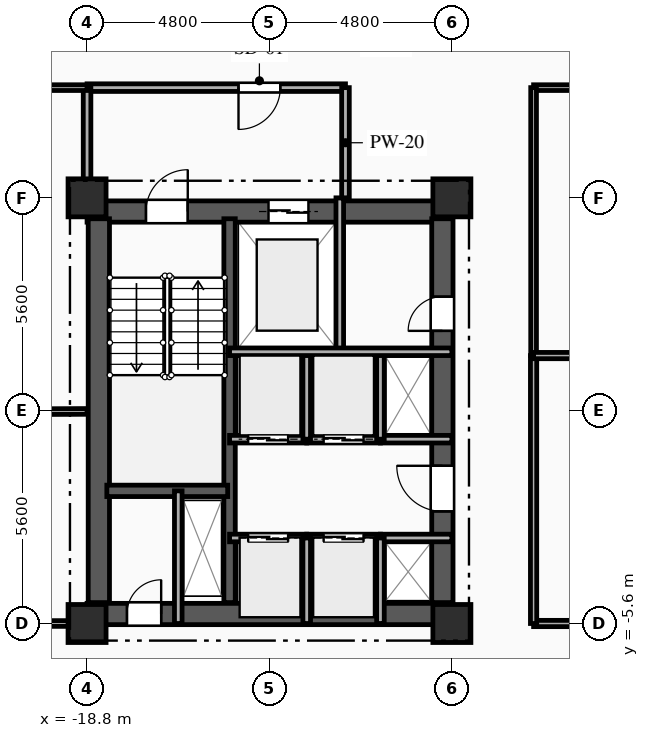
"""IFC4 building model, lengths in metres.
Left out: names, types, materials, properties, quantities, classifications, styles, units other than length and angle.
Written with IfcOpenShell. Run it as: python <this file> out.ifc"""

import sys

from ifc_helpers import new_model, si_unit, direction, frame, frame_2d, origin, origin_2d, place, context, subcontext, project, spatial, rectangle, extrude, element, fill, save


model = new_model("IFC4")
c1 = context("Model", 3, precision=1e-05, world=origin(), true_north=direction((0.0, 1.0)))
c2 = subcontext(c1, "Body", "Model", "MODEL_VIEW")
j1 = project(units=[si_unit("LENGTHUNIT", "METRE"), si_unit("PLANEANGLEUNIT", "RADIAN")], contexts=[c1])
p1 = place(None, origin())
s1 = spatial("IfcSite", under=j1, at=p1, CompositionType="ELEMENT")
p2 = place(p1, origin())
s2 = spatial("IfcBuilding", under=s1, at=p2, CompositionType="ELEMENT")
p3 = place(p2, frame((0.0, 0.0, 119.2)))
s3 = spatial("IfcBuildingStorey", under=s2, at=p3, CompositionType="ELEMENT", Elevation=119.2)
for number, where, z_axis, x_axis in (
    (1, (-18.8, -5.6, 0.0), (0.0, 0.0, 1.0), (1.0, 0.0, 0.0)),
    (2, (-18.8, 5.6, 0.0), (0.0, 0.0, 1.0), (1.0, 0.0, 0.0)),
    (3, (-9.2, -5.6, 0.0), (0.0, 0.0, 1.0), (1.0, 0.0, 0.0)),
    (4, (-9.2, 5.6, 0.0), (0.0, 0.0, 1.0), (1.0, 0.0, 0.0)),
):
    element("IfcColumn", number, at=place(p3, frame(where, z_axis=z_axis, x_axis=x_axis)), inside=s3, PredefinedType="COLUMN", context=c2, shape_type="SweptSolid", body=[
        extrude(rectangle(XDim=1.0, YDim=1.0, at=origin_2d()), origin(), (0.0, 0.0, 1.0), 3.35),
    ])
p4 = place(p3, frame((-18.8, 5.24, 0.0), z_axis=(0.0, 0.0, 1.0), x_axis=(1.0, 0.0, 0.0)))
e5 = element("IfcWall", 5, at=p4, inside=s3, PredefinedType="SHEAR", context=c2, shape_type="SweptSolid", body=[
    extrude(rectangle(XDim=9.6, YDim=0.56, at=frame_2d((4.8, 0.0))), origin(), (0.0, 0.0, 1.0), 3.045),
])
p5 = place(p4, frame((1.55, 0.0, 0.0)))
e6 = element("IfcOpeningElement", 6, at=p5, cuts=e5, PredefinedType="OPENING", context=c2, shape_type="SweptSolid", body=[
    extrude(rectangle(XDim=1.1, YDim=2.15, at=frame_2d((0.55, 1.075))), frame((0.0, 0.29, 0.0), z_axis=(0.0, -1.0, 0.0), x_axis=(1.0, 0.0, 0.0)), (0.0, 0.0, 1.0), 0.58),
])
p6 = place(p4, frame((4.775, 0.0, 0.0)))
e7 = element("IfcOpeningElement", 7, at=p6, cuts=e5, PredefinedType="OPENING", context=c2, shape_type="SweptSolid", body=[
    extrude(rectangle(XDim=1.05, YDim=2.1, at=frame_2d((0.525, 1.05))), frame((0.0, 0.29, 0.0), z_axis=(0.0, -1.0, 0.0), x_axis=(1.0, 0.0, 0.0)), (0.0, 0.0, 1.0), 0.58),
])
p7 = place(p3, frame((-18.8, -5.35, 0.0), z_axis=(0.0, 0.0, 1.0), x_axis=(1.0, 0.0, 0.0)))
e8 = element("IfcWall", 8, at=p7, inside=s3, PredefinedType="SHEAR", context=c2, shape_type="SweptSolid", body=[
    extrude(rectangle(XDim=9.6, YDim=0.56, at=frame_2d((4.8, 0.0))), origin(), (0.0, 0.0, 1.0), 3.045),
])
p8 = place(p7, frame((1.05, 0.0, 0.0)))
e9 = element("IfcOpeningElement", 9, at=p8, cuts=e8, PredefinedType="OPENING", context=c2, shape_type="SweptSolid", body=[
    extrude(rectangle(XDim=0.9, YDim=2.1, at=frame_2d((0.45, 1.05))), frame((0.0, 0.29, 0.0), z_axis=(0.0, -1.0, 0.0), x_axis=(1.0, 0.0, 0.0)), (0.0, 0.0, 1.0), 0.58),
])
p9 = place(p3, frame((-18.49, -5.05, 0.0), z_axis=(0.0, 0.0, 1.0), x_axis=(0.0, 1.0, 0.0)))
e10 = element("IfcWall", 10, at=p9, inside=s3, PredefinedType="SHEAR", context=c2, shape_type="SweptSolid", body=[
    extrude(rectangle(XDim=10.1, YDim=0.56, at=frame_2d((5.05, 0.0))), origin(), (0.0, 0.0, 1.0), 3.045),
])
p10 = place(p3, frame((-9.45, -5.05, 0.0), z_axis=(0.0, 0.0, 1.0), x_axis=(0.0, 1.0, 0.0)))
e11 = element("IfcWall", 11, at=p10, inside=s3, PredefinedType="SHEAR", context=c2, shape_type="SweptSolid", body=[
    extrude(rectangle(XDim=10.1, YDim=0.56, at=frame_2d((5.05, 0.0))), origin(), (0.0, 0.0, 1.0), 3.045),
])
p11 = place(p10, frame((7.15, 0.0, 0.0)))
e12 = element("IfcOpeningElement", 12, at=p11, cuts=e11, PredefinedType="OPENING", context=c2, shape_type="SweptSolid", body=[
    extrude(rectangle(XDim=0.9, YDim=2.1, at=frame_2d((0.45, 1.05))), frame((0.0, 0.29, 0.0), z_axis=(0.0, -1.0, 0.0), x_axis=(1.0, 0.0, 0.0)), (0.0, 0.0, 1.0), 0.58),
])
p12 = place(p10, frame((2.4, 0.0, 0.0)))
e13 = element("IfcOpeningElement", 13, at=p12, cuts=e11, PredefinedType="OPENING", context=c2, shape_type="SweptSolid", body=[
    extrude(rectangle(XDim=1.2, YDim=2.15, at=frame_2d((0.6, 1.075))), frame((0.0, 0.29, 0.0), z_axis=(0.0, -1.0, 0.0), x_axis=(1.0, 0.0, 0.0)), (0.0, 0.0, 1.0), 0.58),
])
p13 = place(p3, frame((-15.05, -5.05, 0.0), z_axis=(0.0, 0.0, 1.0), x_axis=(0.0, 1.0, 0.0)))
e14 = element("IfcWall", 14, at=p13, inside=s3, PredefinedType="SHEAR", context=c2, shape_type="SweptSolid", body=[
    extrude(rectangle(XDim=10.1, YDim=0.3, at=frame_2d((5.05, 0.0))), origin(), (0.0, 0.0, 1.0), 3.045),
])
p14 = place(p3, frame((-18.28, -2.11, 0.0), z_axis=(0.0, 0.0, 1.0), x_axis=(1.0, 0.0, 0.0)))
e15 = element("IfcWall", 15, at=p14, inside=s3, PredefinedType="SHEAR", context=c2, shape_type="SweptSolid", body=[
    extrude(rectangle(XDim=3.18, YDim=0.3, at=frame_2d((1.59, 0.0))), origin(), (0.0, 0.0, 1.0), 3.045),
])
p15 = place(p3, frame((-16.4, -5.6, 0.0), z_axis=(0.0, 0.0, 1.0), x_axis=(0.0, 1.0, 0.0)))
e16 = element("IfcWall", 16, at=p15, inside=s3, PredefinedType="PARTITIONING", context=c2, shape_type="SweptSolid", body=[
    extrude(rectangle(XDim=3.49, YDim=0.2, at=frame_2d((1.745, 0.0))), origin(), (0.0, 0.0, 1.0), 3.045),
])
p16 = place(p3, frame((-12.15, 1.55, 0.0), z_axis=(0.0, 0.0, 1.0), x_axis=(0.0, 1.0, 0.0)))
e17 = element("IfcWall", 17, at=p16, inside=s3, PredefinedType="PARTITIONING", context=c2, shape_type="SweptSolid", body=[
    extrude(rectangle(XDim=4.05, YDim=0.2, at=frame_2d((2.025, 0.0))), origin(), (0.0, 0.0, 1.0), 3.045),
])
p17 = place(p3, frame((-12.0, 8.5, 0.0), z_axis=(0.0, 0.0, 1.0), x_axis=(-1.0, 0.0, 0.0)))
e18 = element("IfcWall", 18, at=p17, inside=s3, PredefinedType="PARTITIONING", context=c2, shape_type="SweptSolid", body=[
    extrude(rectangle(XDim=6.8, YDim=0.2, at=frame_2d((3.4, 0.0))), origin(), (0.0, 0.0, 1.0), 3.045),
])
p18 = place(p17, frame((1.715, 0.0, 0.0)))
e19 = element("IfcOpeningElement", 19, at=p18, cuts=e18, PredefinedType="OPENING", context=c2, shape_type="SweptSolid", body=[
    extrude(rectangle(XDim=1.1, YDim=2.15, at=frame_2d((0.55, 1.075))), frame((0.0, 0.11, 0.0), z_axis=(0.0, -1.0, 0.0), x_axis=(1.0, 0.0, 0.0)), (0.0, 0.0, 1.0), 0.22),
])
p19 = place(p3, frame((-12.0, 5.6, 0.0), z_axis=(0.0, 0.0, 1.0), x_axis=(0.0, 1.0, 0.0)))
e20 = element("IfcWall", 20, at=p19, inside=s3, PredefinedType="PARTITIONING", context=c2, shape_type="SweptSolid", body=[
    extrude(rectangle(XDim=2.9, YDim=0.2, at=frame_2d((1.45, 0.0))), origin(), (0.0, 0.0, 1.0), 3.045),
])
p20 = place(p3, frame((-18.8, 8.5, 0.0), z_axis=(0.0, 0.0, 1.0), x_axis=(0.0, -1.0, 0.0)))
e21 = element("IfcWall", 21, at=p20, inside=s3, PredefinedType="PARTITIONING", context=c2, shape_type="SweptSolid", body=[
    extrude(rectangle(XDim=2.9, YDim=0.2, at=frame_2d((1.45, 0.0))), origin(), (0.0, 0.0, 1.0), 2.53),
])
p21 = place(p3, frame((-15.05, -3.35, 0.0), z_axis=(0.0, 0.0, 1.0), x_axis=(1.0, 0.0, 0.0)))
e22 = element("IfcWall", 22, at=p21, inside=s3, PredefinedType="PARTITIONING", context=c2, shape_type="SweptSolid", body=[
    extrude(rectangle(XDim=2.03, YDim=0.2, at=frame_2d((1.015, 0.0))), origin(), (0.0, 0.0, 1.0), 3.045),
])
p22 = place(p21, frame((0.49, 0.0, 0.0)))
e23 = element("IfcOpeningElement", 23, at=p22, cuts=e22, PredefinedType="OPENING", context=c2, shape_type="SweptSolid", body=[
    extrude(rectangle(XDim=1.05, YDim=2.1, at=frame_2d((0.525, 1.05))), frame((0.0, 0.11, 0.0), z_axis=(0.0, -1.0, 0.0), x_axis=(1.0, 0.0, 0.0)), (0.0, 0.0, 1.0), 0.22),
])
p23 = place(p3, frame((-13.02, -3.35, 0.0), z_axis=(0.0, 0.0, 1.0), x_axis=(1.0, 0.0, 0.0)))
e24 = element("IfcWall", 24, at=p23, inside=s3, PredefinedType="PARTITIONING", context=c2, shape_type="SweptSolid", body=[
    extrude(rectangle(XDim=1.94, YDim=0.2, at=frame_2d((0.97, 0.0))), origin(), (0.0, 0.0, 1.0), 3.045),
])
p24 = place(p23, frame((0.445, 0.0, 0.0)))
e25 = element("IfcOpeningElement", 25, at=p24, cuts=e24, PredefinedType="OPENING", context=c2, shape_type="SweptSolid", body=[
    extrude(rectangle(XDim=1.05, YDim=2.1, at=frame_2d((0.525, 1.05))), frame((0.0, 0.11, 0.0), z_axis=(0.0, -1.0, 0.0), x_axis=(1.0, 0.0, 0.0)), (0.0, 0.0, 1.0), 0.22),
])
p25 = place(p3, frame((-11.08, -3.35, 0.0), z_axis=(0.0, 0.0, 1.0), x_axis=(1.0, 0.0, 0.0)))
e26 = element("IfcWall", 26, at=p25, inside=s3, PredefinedType="PARTITIONING", context=c2, shape_type="SweptSolid", body=[
    extrude(rectangle(XDim=1.88, YDim=0.2, at=frame_2d((0.94, 0.0))), origin(), (0.0, 0.0, 1.0), 2.76),
])
p26 = place(p3, frame((-13.02, -0.75, 0.0), z_axis=(0.0, 0.0, 1.0), x_axis=(-1.0, 0.0, 0.0)))
e27 = element("IfcWall", 27, at=p26, inside=s3, PredefinedType="PARTITIONING", context=c2, shape_type="SweptSolid", body=[
    extrude(rectangle(XDim=2.03, YDim=0.2, at=frame_2d((1.015, 0.0))), origin(), (0.0, 0.0, 1.0), 3.045),
])
p27 = place(p26, frame((0.49, 0.0, 0.0)))
e28 = element("IfcOpeningElement", 28, at=p27, cuts=e27, PredefinedType="OPENING", context=c2, shape_type="SweptSolid", body=[
    extrude(rectangle(XDim=1.05, YDim=2.1, at=frame_2d((0.525, 1.05))), frame((0.0, 0.11, 0.0), z_axis=(0.0, -1.0, 0.0), x_axis=(1.0, 0.0, 0.0)), (0.0, 0.0, 1.0), 0.22),
])
p28 = place(p3, frame((-11.08, -0.75, 0.0), z_axis=(0.0, 0.0, 1.0), x_axis=(-1.0, 0.0, 0.0)))
e29 = element("IfcWall", 29, at=p28, inside=s3, PredefinedType="PARTITIONING", context=c2, shape_type="SweptSolid", body=[
    extrude(rectangle(XDim=1.94, YDim=0.2, at=frame_2d((0.97, 0.0))), origin(), (0.0, 0.0, 1.0), 3.045),
])
p29 = place(p28, frame((0.445, 0.0, 0.0)))
e30 = element("IfcOpeningElement", 30, at=p29, cuts=e29, PredefinedType="OPENING", context=c2, shape_type="SweptSolid", body=[
    extrude(rectangle(XDim=1.05, YDim=2.1, at=frame_2d((0.525, 1.05))), frame((0.0, 0.11, 0.0), z_axis=(0.0, -1.0, 0.0), x_axis=(1.0, 0.0, 0.0)), (0.0, 0.0, 1.0), 0.22),
])
p30 = place(p3, frame((-9.2, -0.75, 0.0), z_axis=(0.0, 0.0, 1.0), x_axis=(-1.0, 0.0, 0.0)))
e31 = element("IfcWall", 31, at=p30, inside=s3, PredefinedType="PARTITIONING", context=c2, shape_type="SweptSolid", body=[
    extrude(rectangle(XDim=1.88, YDim=0.2, at=frame_2d((0.94, 0.0))), origin(), (0.0, 0.0, 1.0), 3.045),
])
for number, where, z_axis, x_axis in (
    (32, (-13.02, -5.6, 0.0), (0.0, 0.0, 1.0), (0.0, 1.0, 0.0)),
    (33, (-11.08, -5.6, 0.0), (0.0, 0.0, 1.0), (0.0, 1.0, 0.0)),
):
    element("IfcWall", number, at=place(p3, frame(where, z_axis=z_axis, x_axis=x_axis)), inside=s3, PredefinedType="PARTITIONING", context=c2, shape_type="SweptSolid", body=[
        extrude(rectangle(XDim=2.25, YDim=0.2, at=frame_2d((1.125, 0.0))), origin(), (0.0, 0.0, 1.0), 3.045),
    ])
for number, where, z_axis, x_axis in (
    (34, (-13.02, -0.75, 0.0), (0.0, 0.0, 1.0), (0.0, 1.0, 0.0)),
    (35, (-11.08, -0.75, 0.0), (0.0, 0.0, 1.0), (0.0, 1.0, 0.0)),
):
    element("IfcWall", number, at=place(p3, frame(where, z_axis=z_axis, x_axis=x_axis)), inside=s3, PredefinedType="PARTITIONING", context=c2, shape_type="SweptSolid", body=[
        extrude(rectangle(XDim=2.3, YDim=0.2, at=frame_2d((1.15, 0.0))), origin(), (0.0, 0.0, 1.0), 3.045),
    ])
p31 = place(p3, frame((-18.8, 8.5, 0.0), z_axis=(0.0, 0.0, 1.0), x_axis=(-1.0, 0.0, 0.0)))
e36 = element("IfcWall", 36, at=p31, inside=s3, PredefinedType="PARTITIONING", context=c2, shape_type="SweptSolid", body=[
    extrude(rectangle(XDim=4.2, YDim=0.15, at=frame_2d((2.1, 0.0))), origin(), (0.0, 0.0, 1.0), 3.045),
])
p32 = place(p31, frame((2.321, 0.0, 0.0)))
e37 = element("IfcOpeningElement", 37, at=p32, cuts=e36, PredefinedType="OPENING", context=c2, shape_type="SweptSolid", body=[
    extrude(rectangle(XDim=1.05, YDim=2.15, at=frame_2d((0.525, 1.075))), frame((0.0, 0.085, 0.0), z_axis=(0.0, -1.0, 0.0), x_axis=(1.0, 0.0, 0.0)), (0.0, 0.0, 1.0), 0.17),
])
p33 = place(p3, frame((0.0, 8.5, 0.0), z_axis=(0.0, 0.0, 1.0), x_axis=(-1.0, 0.0, 0.0)))
e38 = element("IfcWall", 38, at=p33, inside=s3, PredefinedType="PARTITIONING", context=c2, shape_type="SweptSolid", body=[
    extrude(rectangle(XDim=7.05, YDim=0.15, at=frame_2d((3.525, 0.0))), origin(), (0.0, 0.0, 1.0), 3.045),
])
p34 = place(p33, frame((1.185, 0.0, 0.0)))
e39 = element("IfcOpeningElement", 39, at=p34, cuts=e38, PredefinedType="OPENING", context=c2, shape_type="SweptSolid", body=[
    extrude(rectangle(XDim=1.05, YDim=2.15, at=frame_2d((0.525, 1.075))), frame((0.0, 0.085, 0.0), z_axis=(0.0, -1.0, 0.0), x_axis=(1.0, 0.0, 0.0)), (0.0, 0.0, 1.0), 0.17),
])
p35 = place(p3, frame((-23.0, -5.6, 0.0), z_axis=(0.0, 0.0, 1.0), x_axis=(1.0, 0.0, 0.0)))
e40 = element("IfcWall", 40, at=p35, inside=s3, PredefinedType="PARTITIONING", context=c2, shape_type="SweptSolid", body=[
    extrude(rectangle(XDim=4.2, YDim=0.15, at=frame_2d((2.1, 0.0))), origin(), (0.0, 0.0, 1.0), 3.045),
])
p36 = place(p35, frame((0.829, 0.0, 0.0)))
e41 = element("IfcOpeningElement", 41, at=p36, cuts=e40, PredefinedType="OPENING", context=c2, shape_type="SweptSolid", body=[
    extrude(rectangle(XDim=1.05, YDim=2.15, at=frame_2d((0.525, 1.075))), frame((0.0, 0.085, 0.0), z_axis=(0.0, -1.0, 0.0), x_axis=(1.0, 0.0, 0.0)), (0.0, 0.0, 1.0), 0.17),
])
p37 = place(p3, frame((-7.05, -5.6, 0.0), z_axis=(0.0, 0.0, 1.0), x_axis=(1.0, 0.0, 0.0)))
e42 = element("IfcWall", 42, at=p37, inside=s3, PredefinedType="PARTITIONING", context=c2, shape_type="SweptSolid", body=[
    extrude(rectangle(XDim=7.05, YDim=0.165, at=frame_2d((3.525, 0.0))), origin(), (0.0, 0.0, 1.0), 2.53),
])
p38 = place(p37, frame((4.728, 0.0, 0.0)))
e43 = element("IfcOpeningElement", 43, at=p38, cuts=e42, PredefinedType="OPENING", context=c2, shape_type="SweptSolid", body=[
    extrude(rectangle(XDim=1.15, YDim=2.15, at=frame_2d((0.575, 1.075))), frame((0.0, 0.093, 0.0), z_axis=(0.0, -1.0, 0.0), x_axis=(1.0, 0.0, 0.0)), (0.0, 0.0, 1.0), 0.185),
])
p39 = place(p3, frame((-7.05, 1.45, 0.0), z_axis=(0.0, 0.0, 1.0), x_axis=(0.0, -1.0, 0.0)))
e44 = element("IfcWall", 44, at=p39, inside=s3, PredefinedType="PARTITIONING", context=c2, shape_type="SweptSolid", body=[
    extrude(rectangle(XDim=7.05, YDim=0.165, at=frame_2d((3.525, 0.0))), origin(), (0.0, 0.0, 1.0), 3.045),
])
p40 = place(p3, frame((-7.05, 8.5, 0.0), z_axis=(0.0, 0.0, 1.0), x_axis=(0.0, -1.0, 0.0)))
e45 = element("IfcWall", 45, at=p40, inside=s3, PredefinedType="PARTITIONING", context=c2, shape_type="SweptSolid", body=[
    extrude(rectangle(XDim=7.05, YDim=0.15, at=frame_2d((3.525, 0.0))), origin(), (0.0, 0.0, 1.0), 3.045),
])
p41 = place(p3, frame((-28.671, -0.064, 0.0), z_axis=(0.0, 0.0, 1.0), x_axis=(0.999990089865, 0.004451985263, 0.0)))
e46 = element("IfcWall", 46, at=p41, inside=s3, PredefinedType="PARTITIONING", context=c2, shape_type="SweptSolid", body=[
    extrude(rectangle(XDim=9.871, YDim=0.15, at=frame_2d((4.936, 0.0))), origin(), (0.0, 0.0, 1.0), 3.045),
])
p42 = place(p3, frame((-7.05, 1.45, 0.0), z_axis=(0.0, 0.0, 1.0), x_axis=(1.0, 0.0, 0.0)))
e47 = element("IfcWall", 47, at=p42, inside=s3, PredefinedType="PARTITIONING", context=c2, shape_type="SweptSolid", body=[
    extrude(rectangle(XDim=14.1, YDim=0.165, at=frame_2d((7.05, 0.0))), origin(), (0.0, 0.0, 1.0), 3.045),
])
p43 = place(p3, frame((-15.05, 1.55, 0.0), z_axis=(0.0, 0.0, 1.0), x_axis=(1.0, 0.0, 0.0)))
e48 = element("IfcWall", 48, at=p43, inside=s3, PredefinedType="PARTITIONING", context=c2, shape_type="SweptSolid", body=[
    extrude(rectangle(XDim=5.85, YDim=0.2, at=frame_2d((2.925, 0.0))), origin(), (0.0, 0.0, 1.0), 3.045),
])
p44 = place(p5, origin())
e49 = element("IfcDoor", 49, at=p44, inside=s3, OperationType="SINGLE_SWING_RIGHT", PredefinedType="DOOR", context=c2, shape_type="SweptSolid", body=[
    extrude(rectangle(XDim=1.1, YDim=2.15, at=frame_2d((0.55, 1.075))), frame((0.0, 0.025, 0.0), z_axis=(0.0, -1.0, 0.0), x_axis=(1.0, 0.0, 0.0)), (0.0, 0.0, 1.0), 0.05),
])
fill(e6, e49)
p45 = place(p6, origin())
e50 = element("IfcDoor", 50, at=p45, inside=s3, OperationType="DOUBLE_DOOR_SLIDING", PredefinedType="DOOR", context=c2, shape_type="SweptSolid", body=[
    extrude(rectangle(XDim=1.05, YDim=2.1, at=frame_2d((0.525, 1.05))), frame((0.0, 0.025, 0.0), z_axis=(0.0, -1.0, 0.0), x_axis=(1.0, 0.0, 0.0)), (0.0, 0.0, 1.0), 0.05),
])
fill(e7, e50)
p46 = place(p8, origin())
e51 = element("IfcDoor", 51, at=p46, inside=s3, OperationType="SINGLE_SWING_RIGHT", PredefinedType="DOOR", context=c2, shape_type="SweptSolid", body=[
    extrude(rectangle(XDim=0.9, YDim=2.1, at=frame_2d((0.45, 1.05))), frame((0.0, 0.025, 0.0), z_axis=(0.0, -1.0, 0.0), x_axis=(1.0, 0.0, 0.0)), (0.0, 0.0, 1.0), 0.05),
])
fill(e9, e51)
p47 = place(p18, origin())
e52 = element("IfcDoor", 52, at=p47, inside=s3, OperationType="SINGLE_SWING_RIGHT", PredefinedType="DOOR", context=c2, shape_type="SweptSolid", body=[
    extrude(rectangle(XDim=1.1, YDim=2.15, at=frame_2d((0.55, 1.075))), frame((0.0, 0.025, 0.0), z_axis=(0.0, -1.0, 0.0), x_axis=(1.0, 0.0, 0.0)), (0.0, 0.0, 1.0), 0.05),
])
fill(e19, e52)
p48 = place(p11, origin())
e53 = element("IfcDoor", 53, at=p48, inside=s3, OperationType="SINGLE_SWING_LEFT", PredefinedType="DOOR", context=c2, shape_type="SweptSolid", body=[
    extrude(rectangle(XDim=0.9, YDim=2.1, at=frame_2d((0.45, 1.05))), frame((0.0, 0.025, 0.0), z_axis=(0.0, -1.0, 0.0), x_axis=(1.0, 0.0, 0.0)), (0.0, 0.0, 1.0), 0.05),
])
fill(e12, e53)
p49 = place(p22, origin())
e54 = element("IfcDoor", 54, at=p49, inside=s3, OperationType="DOUBLE_DOOR_SLIDING", PredefinedType="DOOR", context=c2, shape_type="SweptSolid", body=[
    extrude(rectangle(XDim=1.05, YDim=2.1, at=frame_2d((0.525, 1.05))), frame((0.0, 0.025, 0.0), z_axis=(0.0, -1.0, 0.0), x_axis=(1.0, 0.0, 0.0)), (0.0, 0.0, 1.0), 0.05),
])
fill(e23, e54)
p50 = place(p24, origin())
e55 = element("IfcDoor", 55, at=p50, inside=s3, OperationType="DOUBLE_DOOR_SLIDING", PredefinedType="DOOR", context=c2, shape_type="SweptSolid", body=[
    extrude(rectangle(XDim=1.05, YDim=2.1, at=frame_2d((0.525, 1.05))), frame((0.0, 0.025, 0.0), z_axis=(0.0, -1.0, 0.0), x_axis=(1.0, 0.0, 0.0)), (0.0, 0.0, 1.0), 0.05),
])
fill(e25, e55)
p51 = place(p27, origin())
e56 = element("IfcDoor", 56, at=p51, inside=s3, OperationType="DOUBLE_DOOR_SLIDING", PredefinedType="DOOR", context=c2, shape_type="SweptSolid", body=[
    extrude(rectangle(XDim=1.05, YDim=2.1, at=frame_2d((0.525, 1.05))), frame((0.0, 0.025, 0.0), z_axis=(0.0, -1.0, 0.0), x_axis=(1.0, 0.0, 0.0)), (0.0, 0.0, 1.0), 0.05),
])
fill(e28, e56)
p52 = place(p29, origin())
e57 = element("IfcDoor", 57, at=p52, inside=s3, OperationType="DOUBLE_DOOR_SLIDING", PredefinedType="DOOR", context=c2, shape_type="SweptSolid", body=[
    extrude(rectangle(XDim=1.05, YDim=2.1, at=frame_2d((0.525, 1.05))), frame((0.0, 0.025, 0.0), z_axis=(0.0, -1.0, 0.0), x_axis=(1.0, 0.0, 0.0)), (0.0, 0.0, 1.0), 0.05),
])
fill(e30, e57)
p53 = place(p12, origin())
e58 = element("IfcDoor", 58, at=p53, inside=s3, OperationType="SINGLE_SWING_RIGHT", PredefinedType="DOOR", context=c2, shape_type="SweptSolid", body=[
    extrude(rectangle(XDim=1.2, YDim=2.15, at=frame_2d((0.6, 1.075))), frame((0.0, 0.025, 0.0), z_axis=(0.0, -1.0, 0.0), x_axis=(1.0, 0.0, 0.0)), (0.0, 0.0, 1.0), 0.05),
])
fill(e13, e58)
save(model, sys.argv[1])
